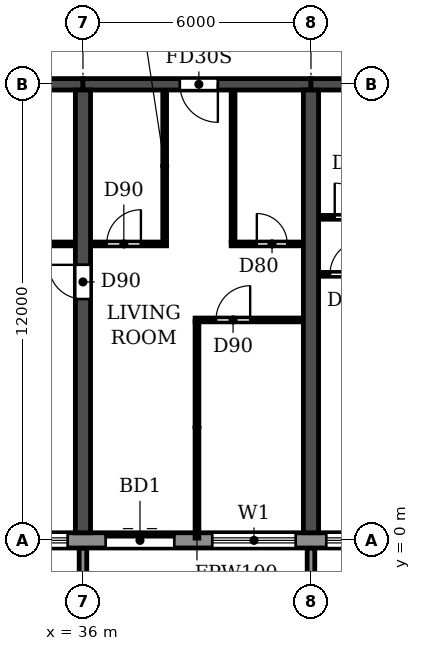
"""IFC4 building model, lengths in metres.
Left out: names, types, materials, properties, quantities, classifications, styles, units other than length and angle.
Written with IfcOpenShell. Run it as: python <this file> out.ifc"""

import sys

from ifc_helpers import new_model, si_unit, direction, frame, frame_2d, origin, place, context, subcontext, project, spatial, polyline, rectangle, outline, extrude, source, transform, mapped, element, fill, save


model = new_model("IFC4")
c1 = context("Model", 3, precision=1e-05, world=origin(), true_north=direction((0.0, 1.0)))
c2 = subcontext(c1, "Body", "Model", "MODEL_VIEW")
j1 = project(units=[si_unit("LENGTHUNIT", "METRE"), si_unit("PLANEANGLEUNIT", "RADIAN")], contexts=[c1])
p1 = place(None, origin())
s1 = spatial("IfcSite", under=j1, at=p1, CompositionType="ELEMENT")
p2 = place(p1, origin())
s2 = spatial("IfcBuilding", under=s1, at=p2, CompositionType="ELEMENT")
p3 = place(p2, frame((0.0, 0.0, 56.4)))
s3 = spatial("IfcBuildingStorey", under=s2, at=p3, CompositionType="ELEMENT", Elevation=56.4)
p4 = place(p3, frame((36.0, 0.2, 0.0), z_axis=(0.0, 0.0, 1.0), x_axis=(0.0, 1.0, 0.0)))
e1 = element("IfcWall", 1, at=p4, inside=s3, PredefinedType="SHEAR", context=c2, shape_type="SweptSolid", body=[
    extrude(rectangle(XDim=11.65, YDim=0.4, at=frame_2d((5.825, 0.0))), origin(), (0.0, 0.0, 1.0), 3.05),
])
p5 = place(p4, frame((6.15, 0.0, 0.0)))
e2 = element("IfcOpeningElement", 2, at=p5, cuts=e1, PredefinedType="OPENING", context=c2, shape_type="SweptSolid", body=[
    extrude(rectangle(XDim=0.9, YDim=2.1, at=frame_2d((0.45, 1.05))), frame((0.0, 0.21, 0.0), z_axis=(0.0, -1.0, 0.0), x_axis=(1.0, 0.0, 0.0)), (0.0, 0.0, 1.0), 0.42),
])
p6 = place(p3, frame((42.0, 0.2, 0.0), z_axis=(0.0, 0.0, 1.0), x_axis=(0.0, 1.0, 0.0)))
e3 = element("IfcWall", 3, at=p6, inside=s3, PredefinedType="SHEAR", context=c2, shape_type="SweptSolid", body=[
    extrude(rectangle(XDim=11.65, YDim=0.4, at=frame_2d((5.825, 0.0))), origin(), (0.0, 0.0, 1.0), 3.05),
])
p7 = place(p3, frame((30.0, 12.0, 0.0), z_axis=(0.0, 0.0, 1.0), x_axis=(1.0, 0.0, 0.0)))
e4 = element("IfcWall", 4, at=p7, inside=s3, PredefinedType="SHEAR", context=c2, shape_type="SweptSolid", body=[
    extrude(rectangle(XDim=6.0, YDim=0.3, at=frame_2d((3.0, 0.0))), origin(), (0.0, 0.0, 1.0), 2.45),
])
p8 = place(p3, frame((36.0, 12.0, 0.0), z_axis=(0.0, 0.0, 1.0), x_axis=(1.0, 0.0, 0.0)))
e5 = element("IfcWall", 5, at=p8, inside=s3, PredefinedType="SHEAR", context=c2, shape_type="SweptSolid", body=[
    extrude(rectangle(XDim=6.0, YDim=0.3, at=frame_2d((3.0, 0.0))), origin(), (0.0, 0.0, 1.0), 2.45),
])
p9 = place(p8, frame((2.55, 0.0, 0.0)))
e6 = element("IfcOpeningElement", 6, at=p9, cuts=e5, PredefinedType="OPENING", context=c2, shape_type="SweptSolid", body=[
    extrude(rectangle(XDim=1.0, YDim=2.1, at=frame_2d((0.5, 1.05))), frame((0.0, 0.16, 0.0), z_axis=(0.0, -1.0, 0.0), x_axis=(1.0, 0.0, 0.0)), (0.0, 0.0, 1.0), 0.32),
])
p10 = place(p3, frame((42.0, 12.0, 0.0), z_axis=(0.0, 0.0, 1.0), x_axis=(1.0, 0.0, 0.0)))
e7 = element("IfcWall", 7, at=p10, inside=s3, PredefinedType="SHEAR", context=c2, shape_type="SweptSolid", body=[
    extrude(rectangle(XDim=6.0, YDim=0.3, at=frame_2d((3.0, 0.0))), origin(), (0.0, 0.0, 1.0), 2.45),
])
p11 = place(p10, frame((2.55, 0.0, 0.0)))
e8 = element("IfcOpeningElement", 8, at=p11, cuts=e7, PredefinedType="OPENING", context=c2, shape_type="SweptSolid", body=[
    extrude(rectangle(XDim=1.0, YDim=2.1, at=frame_2d((0.5, 1.05))), frame((0.0, 0.16, 0.0), z_axis=(0.0, -1.0, 0.0), x_axis=(1.0, 0.0, 0.0)), (0.0, 0.0, 1.0), 0.32),
])
p12 = place(p3, frame((10.683, 0.0, 0.0), z_axis=(0.0, 0.0, 1.0), x_axis=(1.0, 0.0, 0.0)))
e9 = element("IfcWall", 9, at=p12, inside=s3, PredefinedType="STANDARD", context=c2, shape_type="SweptSolid", body=[
    extrude(rectangle(XDim=80.634, YDim=0.4, at=frame_2d((40.317, 0.0))), origin(), (0.0, 0.0, 1.0), 3.05),
])
p13 = place(p12, frame((1.717, 0.0, 0.9)))
e10 = element("IfcOpeningElement", 10, at=p13, cuts=e9, PredefinedType="OPENING", context=c2, shape_type="SweptSolid", body=[
    extrude(rectangle(XDim=2.2, YDim=1.5, at=frame_2d((1.1, 0.75))), frame((0.0, 0.21, 0.0), z_axis=(0.0, -1.0, 0.0), x_axis=(1.0, 0.0, 0.0)), (0.0, 0.0, 1.0), 0.42),
])
p14 = place(p12, frame((4.917, 0.0, 0.0)))
e11 = element("IfcOpeningElement", 11, at=p14, cuts=e9, PredefinedType="OPENING", context=c2, shape_type="SweptSolid", body=[
    extrude(rectangle(XDim=1.8, YDim=2.4, at=frame_2d((0.9, 1.2))), frame((0.0, 0.21, 0.0), z_axis=(0.0, -1.0, 0.0), x_axis=(1.0, 0.0, 0.0)), (0.0, 0.0, 1.0), 0.42),
])
p15 = place(p12, frame((7.717, 0.0, 0.9)))
e12 = element("IfcOpeningElement", 12, at=p15, cuts=e9, PredefinedType="OPENING", context=c2, shape_type="SweptSolid", body=[
    extrude(rectangle(XDim=2.2, YDim=1.5, at=frame_2d((1.1, 0.75))), frame((0.0, 0.21, 0.0), z_axis=(0.0, -1.0, 0.0), x_axis=(1.0, 0.0, 0.0)), (0.0, 0.0, 1.0), 0.42),
])
p16 = place(p12, frame((10.717, 0.0, 0.9)))
e13 = element("IfcOpeningElement", 13, at=p16, cuts=e9, PredefinedType="OPENING", context=c2, shape_type="SweptSolid", body=[
    extrude(rectangle(XDim=2.2, YDim=1.5, at=frame_2d((1.1, 0.75))), frame((0.0, 0.21, 0.0), z_axis=(0.0, -1.0, 0.0), x_axis=(1.0, 0.0, 0.0)), (0.0, 0.0, 1.0), 0.42),
])
p17 = place(p12, frame((13.717, 0.0, 0.9)))
e14 = element("IfcOpeningElement", 14, at=p17, cuts=e9, PredefinedType="OPENING", context=c2, shape_type="SweptSolid", body=[
    extrude(rectangle(XDim=2.2, YDim=1.5, at=frame_2d((1.1, 0.75))), frame((0.0, 0.21, 0.0), z_axis=(0.0, -1.0, 0.0), x_axis=(1.0, 0.0, 0.0)), (0.0, 0.0, 1.0), 0.42),
])
p18 = place(p12, frame((16.917, 0.0, 0.0)))
e15 = element("IfcOpeningElement", 15, at=p18, cuts=e9, PredefinedType="OPENING", context=c2, shape_type="SweptSolid", body=[
    extrude(rectangle(XDim=1.8, YDim=2.4, at=frame_2d((0.9, 1.2))), frame((0.0, 0.21, 0.0), z_axis=(0.0, -1.0, 0.0), x_axis=(1.0, 0.0, 0.0)), (0.0, 0.0, 1.0), 0.42),
])
p19 = place(p12, frame((19.717, 0.0, 0.9)))
e16 = element("IfcOpeningElement", 16, at=p19, cuts=e9, PredefinedType="OPENING", context=c2, shape_type="SweptSolid", body=[
    extrude(rectangle(XDim=2.2, YDim=1.5, at=frame_2d((1.1, 0.75))), frame((0.0, 0.21, 0.0), z_axis=(0.0, -1.0, 0.0), x_axis=(1.0, 0.0, 0.0)), (0.0, 0.0, 1.0), 0.42),
])
p20 = place(p12, frame((22.717, 0.0, 0.9)))
e17 = element("IfcOpeningElement", 17, at=p20, cuts=e9, PredefinedType="OPENING", context=c2, shape_type="SweptSolid", body=[
    extrude(rectangle(XDim=2.2, YDim=1.5, at=frame_2d((1.1, 0.75))), frame((0.0, 0.21, 0.0), z_axis=(0.0, -1.0, 0.0), x_axis=(1.0, 0.0, 0.0)), (0.0, 0.0, 1.0), 0.42),
])
p21 = place(p12, frame((25.917, 0.0, 0.0)))
e18 = element("IfcOpeningElement", 18, at=p21, cuts=e9, PredefinedType="OPENING", context=c2, shape_type="SweptSolid", body=[
    extrude(rectangle(XDim=1.8, YDim=2.4, at=frame_2d((0.9, 1.2))), frame((0.0, 0.21, 0.0), z_axis=(0.0, -1.0, 0.0), x_axis=(1.0, 0.0, 0.0)), (0.0, 0.0, 1.0), 0.42),
])
p22 = place(p12, frame((28.717, 0.0, 0.9)))
e19 = element("IfcOpeningElement", 19, at=p22, cuts=e9, PredefinedType="OPENING", context=c2, shape_type="SweptSolid", body=[
    extrude(rectangle(XDim=2.2, YDim=1.5, at=frame_2d((1.1, 0.75))), frame((0.0, 0.21, 0.0), z_axis=(0.0, -1.0, 0.0), x_axis=(1.0, 0.0, 0.0)), (0.0, 0.0, 1.0), 0.42),
])
p23 = place(p12, frame((31.717, 0.0, 0.9)))
e20 = element("IfcOpeningElement", 20, at=p23, cuts=e9, PredefinedType="OPENING", context=c2, shape_type="SweptSolid", body=[
    extrude(rectangle(XDim=2.2, YDim=1.5, at=frame_2d((1.1, 0.75))), frame((0.0, 0.21, 0.0), z_axis=(0.0, -1.0, 0.0), x_axis=(1.0, 0.0, 0.0)), (0.0, 0.0, 1.0), 0.42),
])
p24 = place(p12, frame((34.717, 0.0, 0.9)))
e21 = element("IfcOpeningElement", 21, at=p24, cuts=e9, PredefinedType="OPENING", context=c2, shape_type="SweptSolid", body=[
    extrude(rectangle(XDim=2.2, YDim=1.5, at=frame_2d((1.1, 0.75))), frame((0.0, 0.21, 0.0), z_axis=(0.0, -1.0, 0.0), x_axis=(1.0, 0.0, 0.0)), (0.0, 0.0, 1.0), 0.42),
])
p25 = place(p12, frame((37.717, 0.0, 0.9)))
e22 = element("IfcOpeningElement", 22, at=p25, cuts=e9, PredefinedType="OPENING", context=c2, shape_type="SweptSolid", body=[
    extrude(rectangle(XDim=2.2, YDim=1.5, at=frame_2d((1.1, 0.75))), frame((0.0, 0.21, 0.0), z_axis=(0.0, -1.0, 0.0), x_axis=(1.0, 0.0, 0.0)), (0.0, 0.0, 1.0), 0.42),
])
p26 = place(p12, frame((40.917, 0.0, 0.0)))
e23 = element("IfcOpeningElement", 23, at=p26, cuts=e9, PredefinedType="OPENING", context=c2, shape_type="SweptSolid", body=[
    extrude(rectangle(XDim=1.8, YDim=2.4, at=frame_2d((0.9, 1.2))), frame((0.0, 0.21, 0.0), z_axis=(0.0, -1.0, 0.0), x_axis=(1.0, 0.0, 0.0)), (0.0, 0.0, 1.0), 0.42),
])
p27 = place(p12, frame((43.717, 0.0, 0.9)))
e24 = element("IfcOpeningElement", 24, at=p27, cuts=e9, PredefinedType="OPENING", context=c2, shape_type="SweptSolid", body=[
    extrude(rectangle(XDim=2.2, YDim=1.5, at=frame_2d((1.1, 0.75))), frame((0.0, 0.21, 0.0), z_axis=(0.0, -1.0, 0.0), x_axis=(1.0, 0.0, 0.0)), (0.0, 0.0, 1.0), 0.42),
])
p28 = place(p12, frame((46.717, 0.0, 0.9)))
e25 = element("IfcOpeningElement", 25, at=p28, cuts=e9, PredefinedType="OPENING", context=c2, shape_type="SweptSolid", body=[
    extrude(rectangle(XDim=2.2, YDim=1.5, at=frame_2d((1.1, 0.75))), frame((0.0, 0.21, 0.0), z_axis=(0.0, -1.0, 0.0), x_axis=(1.0, 0.0, 0.0)), (0.0, 0.0, 1.0), 0.42),
])
p29 = place(p12, frame((49.717, 0.0, 0.9)))
e26 = element("IfcOpeningElement", 26, at=p29, cuts=e9, PredefinedType="OPENING", context=c2, shape_type="SweptSolid", body=[
    extrude(rectangle(XDim=2.2, YDim=1.5, at=frame_2d((1.1, 0.75))), frame((0.0, 0.21, 0.0), z_axis=(0.0, -1.0, 0.0), x_axis=(1.0, 0.0, 0.0)), (0.0, 0.0, 1.0), 0.42),
])
p30 = place(p12, frame((52.717, 0.0, 0.9)))
e27 = element("IfcOpeningElement", 27, at=p30, cuts=e9, PredefinedType="OPENING", context=c2, shape_type="SweptSolid", body=[
    extrude(rectangle(XDim=2.2, YDim=1.5, at=frame_2d((1.1, 0.75))), frame((0.0, 0.21, 0.0), z_axis=(0.0, -1.0, 0.0), x_axis=(1.0, 0.0, 0.0)), (0.0, 0.0, 1.0), 0.42),
])
p31 = place(p12, frame((55.717, 0.0, 0.9)))
e28 = element("IfcOpeningElement", 28, at=p31, cuts=e9, PredefinedType="OPENING", context=c2, shape_type="SweptSolid", body=[
    extrude(rectangle(XDim=2.2, YDim=1.5, at=frame_2d((1.1, 0.75))), frame((0.0, 0.21, 0.0), z_axis=(0.0, -1.0, 0.0), x_axis=(1.0, 0.0, 0.0)), (0.0, 0.0, 1.0), 0.42),
])
p32 = place(p12, frame((58.717, 0.0, 0.9)))
e29 = element("IfcOpeningElement", 29, at=p32, cuts=e9, PredefinedType="OPENING", context=c2, shape_type="SweptSolid", body=[
    extrude(rectangle(XDim=2.2, YDim=1.5, at=frame_2d((1.1, 0.75))), frame((0.0, 0.21, 0.0), z_axis=(0.0, -1.0, 0.0), x_axis=(1.0, 0.0, 0.0)), (0.0, 0.0, 1.0), 0.42),
])
p33 = place(p12, frame((61.717, 0.0, 0.9)))
e30 = element("IfcOpeningElement", 30, at=p33, cuts=e9, PredefinedType="OPENING", context=c2, shape_type="SweptSolid", body=[
    extrude(rectangle(XDim=2.2, YDim=1.5, at=frame_2d((1.1, 0.75))), frame((0.0, 0.21, 0.0), z_axis=(0.0, -1.0, 0.0), x_axis=(1.0, 0.0, 0.0)), (0.0, 0.0, 1.0), 0.42),
])
p34 = place(p12, frame((64.917, 0.0, 0.0)))
e31 = element("IfcOpeningElement", 31, at=p34, cuts=e9, PredefinedType="OPENING", context=c2, shape_type="SweptSolid", body=[
    extrude(rectangle(XDim=1.8, YDim=2.4, at=frame_2d((0.9, 1.2))), frame((0.0, 0.21, 0.0), z_axis=(0.0, -1.0, 0.0), x_axis=(1.0, 0.0, 0.0)), (0.0, 0.0, 1.0), 0.42),
])
p35 = place(p12, frame((67.717, 0.0, 0.9)))
e32 = element("IfcOpeningElement", 32, at=p35, cuts=e9, PredefinedType="OPENING", context=c2, shape_type="SweptSolid", body=[
    extrude(rectangle(XDim=2.2, YDim=1.5, at=frame_2d((1.1, 0.75))), frame((0.0, 0.21, 0.0), z_axis=(0.0, -1.0, 0.0), x_axis=(1.0, 0.0, 0.0)), (0.0, 0.0, 1.0), 0.42),
])
p36 = place(p12, frame((70.717, 0.0, 0.9)))
e33 = element("IfcOpeningElement", 33, at=p36, cuts=e9, PredefinedType="OPENING", context=c2, shape_type="SweptSolid", body=[
    extrude(rectangle(XDim=2.2, YDim=1.5, at=frame_2d((1.1, 0.75))), frame((0.0, 0.21, 0.0), z_axis=(0.0, -1.0, 0.0), x_axis=(1.0, 0.0, 0.0)), (0.0, 0.0, 1.0), 0.42),
])
p37 = place(p12, frame((73.717, 0.0, 0.9)))
e34 = element("IfcOpeningElement", 34, at=p37, cuts=e9, PredefinedType="OPENING", context=c2, shape_type="SweptSolid", body=[
    extrude(rectangle(XDim=2.2, YDim=1.5, at=frame_2d((1.1, 0.75))), frame((0.0, 0.21, 0.0), z_axis=(0.0, -1.0, 0.0), x_axis=(1.0, 0.0, 0.0)), (0.0, 0.0, 1.0), 0.42),
])
p38 = place(p12, frame((76.917, 0.0, 0.0)))
e35 = element("IfcOpeningElement", 35, at=p38, cuts=e9, PredefinedType="OPENING", context=c2, shape_type="SweptSolid", body=[
    extrude(rectangle(XDim=1.8, YDim=2.4, at=frame_2d((0.9, 1.2))), frame((0.0, 0.21, 0.0), z_axis=(0.0, -1.0, 0.0), x_axis=(1.0, 0.0, 0.0)), (0.0, 0.0, 1.0), 0.42),
])
m1 = source(origin(), c2, "Body", "SweptSolid", [
    extrude(outline(polyline([(0.0, 0.0), (0.2, 0.0), (0.2, 1.65), (0.0, 1.65), (0.0, 0.0)])), origin(), (0.0, 0.0, 1.0), 3.1),
])
for number, where in (
    (36, (35.9, -1.85, 0.0)),
    (37, (41.9, -1.85, 0.0)),
):
    element("IfcWall", number, at=place(p3, frame(where)), inside=s3, PredefinedType="STANDARD", context=c2, shape_type="MappedRepresentation", body=[
        mapped(m1, transform((0.0, 0.0, 0.0))),
    ])
p39 = place(p3, frame((38.95, 5.8, 0.0), z_axis=(0.0, 0.0, 1.0), x_axis=(1.0, 0.0, 0.0)))
e38 = element("IfcWall", 38, at=p39, inside=s3, PredefinedType="PARTITIONING", context=c2, shape_type="SweptSolid", body=[
    extrude(rectangle(XDim=2.84, YDim=0.1, at=frame_2d((1.42, 0.0))), origin(), (0.0, 0.0, 1.0), 3.05),
])
p40 = place(p39, frame((0.55, 0.0, 0.0)))
e39 = element("IfcOpeningElement", 39, at=p40, cuts=e38, PredefinedType="OPENING", context=c2, shape_type="SweptSolid", body=[
    extrude(rectangle(XDim=0.9, YDim=2.1, at=frame_2d((0.45, 1.05))), frame((0.0, 0.06, 0.0), z_axis=(0.0, -1.0, 0.0), x_axis=(1.0, 0.0, 0.0)), (0.0, 0.0, 1.0), 0.12),
])
p41 = place(p3, frame((42.21, 7.0, 0.0), z_axis=(0.0, 0.0, 1.0), x_axis=(1.0, 0.0, 0.0)))
e40 = element("IfcWall", 40, at=p41, inside=s3, PredefinedType="PARTITIONING", context=c2, shape_type="SweptSolid", body=[
    extrude(rectangle(XDim=2.84, YDim=0.1, at=frame_2d((1.42, 0.0))), origin(), (0.0, 0.0, 1.0), 3.05),
])
p42 = place(p41, frame((0.29, 0.0, 0.0)))
e41 = element("IfcOpeningElement", 41, at=p42, cuts=e40, PredefinedType="OPENING", context=c2, shape_type="SweptSolid", body=[
    extrude(rectangle(XDim=0.9, YDim=2.1, at=frame_2d((0.45, 1.05))), frame((0.0, 0.06, 0.0), z_axis=(0.0, -1.0, 0.0), x_axis=(1.0, 0.0, 0.0)), (0.0, 0.0, 1.0), 0.12),
])
p43 = place(p3, frame((33.1, 7.8, 0.0), z_axis=(0.0, 0.0, 1.0), x_axis=(1.0, 0.0, 0.0)))
e42 = element("IfcWall", 42, at=p43, inside=s3, PredefinedType="PARTITIONING", context=c2, shape_type="SweptSolid", body=[
    extrude(rectangle(XDim=2.69, YDim=0.1, at=frame_2d((1.345, 0.0))), origin(), (0.0, 0.0, 1.0), 3.05),
])
p44 = place(p43, frame((1.0, 0.0, 0.0)))
e43 = element("IfcOpeningElement", 43, at=p44, cuts=e42, PredefinedType="OPENING", context=c2, shape_type="SweptSolid", body=[
    extrude(rectangle(XDim=0.8, YDim=2.1, at=frame_2d((0.4, 1.05))), frame((0.0, 0.06, 0.0), z_axis=(0.0, -1.0, 0.0), x_axis=(1.0, 0.0, 0.0)), (0.0, 0.0, 1.0), 0.12),
])
p45 = place(p3, frame((36.21, 7.8, 0.0), z_axis=(0.0, 0.0, 1.0), x_axis=(1.0, 0.0, 0.0)))
e44 = element("IfcWall", 44, at=p45, inside=s3, PredefinedType="PARTITIONING", context=c2, shape_type="SweptSolid", body=[
    extrude(rectangle(XDim=1.99, YDim=0.1, at=frame_2d((0.995, 0.0))), origin(), (0.0, 0.0, 1.0), 3.05),
])
p46 = place(p45, frame((0.415, 0.0, 0.0)))
e45 = element("IfcOpeningElement", 45, at=p46, cuts=e44, PredefinedType="OPENING", context=c2, shape_type="SweptSolid", body=[
    extrude(rectangle(XDim=0.9, YDim=2.1, at=frame_2d((0.45, 1.05))), frame((0.0, 0.06, 0.0), z_axis=(0.0, -1.0, 0.0), x_axis=(1.0, 0.0, 0.0)), (0.0, 0.0, 1.0), 0.12),
])
p47 = place(p3, frame((39.9, 7.8, 0.0), z_axis=(0.0, 0.0, 1.0), x_axis=(1.0, 0.0, 0.0)))
e46 = element("IfcWall", 46, at=p47, inside=s3, PredefinedType="PARTITIONING", context=c2, shape_type="SweptSolid", body=[
    extrude(rectangle(XDim=1.89, YDim=0.1, at=frame_2d((0.945, 0.0))), origin(), (0.0, 0.0, 1.0), 3.05),
])
p48 = place(p47, frame((0.675, 0.0, 0.0)))
e47 = element("IfcOpeningElement", 47, at=p48, cuts=e46, PredefinedType="OPENING", context=c2, shape_type="SweptSolid", body=[
    extrude(rectangle(XDim=0.8, YDim=2.1, at=frame_2d((0.4, 1.05))), frame((0.0, 0.06, 0.0), z_axis=(0.0, -1.0, 0.0), x_axis=(1.0, 0.0, 0.0)), (0.0, 0.0, 1.0), 0.12),
])
p49 = place(p3, frame((42.21, 8.5, 0.0), z_axis=(0.0, 0.0, 1.0), x_axis=(1.0, 0.0, 0.0)))
e48 = element("IfcWall", 48, at=p49, inside=s3, PredefinedType="PARTITIONING", context=c2, shape_type="SweptSolid", body=[
    extrude(rectangle(XDim=1.99, YDim=0.1, at=frame_2d((0.995, 0.0))), origin(), (0.0, 0.0, 1.0), 3.05),
])
p50 = place(p49, frame((0.415, 0.0, 0.0)))
e49 = element("IfcOpeningElement", 49, at=p50, cuts=e48, PredefinedType="OPENING", context=c2, shape_type="SweptSolid", body=[
    extrude(rectangle(XDim=0.9, YDim=2.1, at=frame_2d((0.45, 1.05))), frame((0.0, 0.06, 0.0), z_axis=(0.0, -1.0, 0.0), x_axis=(1.0, 0.0, 0.0)), (0.0, 0.0, 1.0), 0.12),
])
p51 = place(p3, frame((38.15, 7.85, 0.0), z_axis=(0.0, 0.0, 1.0), x_axis=(0.0, 1.0, 0.0)))
e50 = element("IfcWall", 50, at=p51, inside=s3, PredefinedType="PARTITIONING", context=c2, shape_type="SweptSolid", body=[
    extrude(rectangle(XDim=3.99, YDim=0.1, at=frame_2d((1.995, 0.0))), origin(), (0.0, 0.0, 1.0), 3.05),
])
p52 = place(p3, frame((39.0, 0.06, 0.0), z_axis=(0.0, 0.0, 1.0), x_axis=(0.0, 1.0, 0.0)))
e51 = element("IfcWall", 51, at=p52, inside=s3, PredefinedType="PARTITIONING", context=c2, shape_type="SweptSolid", body=[
    extrude(rectangle(XDim=5.69, YDim=0.1, at=frame_2d((2.845, 0.0))), origin(), (0.0, 0.0, 1.0), 3.05),
])
p53 = place(p3, frame((39.95, 7.85, 0.0), z_axis=(0.0, 0.0, 1.0), x_axis=(0.0, 1.0, 0.0)))
e52 = element("IfcWall", 52, at=p53, inside=s3, PredefinedType="PARTITIONING", context=c2, shape_type="SweptSolid", body=[
    extrude(rectangle(XDim=3.99, YDim=0.1, at=frame_2d((1.995, 0.0))), origin(), (0.0, 0.0, 1.0), 3.05),
])
p54 = place(p20, origin())
e53 = element("IfcWindow", 53, at=p54, inside=s3, PartitioningType="DOUBLE_PANEL_HORIZONTAL", PredefinedType="WINDOW", context=c2, shape_type="SweptSolid", body=[
    extrude(rectangle(XDim=2.2, YDim=1.5, at=frame_2d((1.1, 0.75))), frame((0.0, 0.03, 0.0), z_axis=(0.0, -1.0, 0.0), x_axis=(1.0, 0.0, 0.0)), (0.0, 0.0, 1.0), 0.06),
])
fill(e17, e53)
p55 = place(p21, origin())
e54 = element("IfcDoor", 54, at=p55, inside=s3, OperationType="DOUBLE_DOOR_SLIDING", PredefinedType="DOOR", context=c2, shape_type="SweptSolid", body=[
    extrude(rectangle(XDim=1.8, YDim=2.4, at=frame_2d((0.9, 1.2))), frame((0.0, 0.025, 0.0), z_axis=(0.0, -1.0, 0.0), x_axis=(1.0, 0.0, 0.0)), (0.0, 0.0, 1.0), 0.05),
])
fill(e18, e54)
p56 = place(p22, origin())
e55 = element("IfcWindow", 55, at=p56, inside=s3, PartitioningType="DOUBLE_PANEL_HORIZONTAL", PredefinedType="WINDOW", context=c2, shape_type="SweptSolid", body=[
    extrude(rectangle(XDim=2.2, YDim=1.5, at=frame_2d((1.1, 0.75))), frame((0.0, 0.03, 0.0), z_axis=(0.0, -1.0, 0.0), x_axis=(1.0, 0.0, 0.0)), (0.0, 0.0, 1.0), 0.06),
])
fill(e19, e55)
p57 = place(p23, origin())
e56 = element("IfcWindow", 56, at=p57, inside=s3, PartitioningType="DOUBLE_PANEL_HORIZONTAL", PredefinedType="WINDOW", context=c2, shape_type="SweptSolid", body=[
    extrude(rectangle(XDim=2.2, YDim=1.5, at=frame_2d((1.1, 0.75))), frame((0.0, 0.03, 0.0), z_axis=(0.0, -1.0, 0.0), x_axis=(1.0, 0.0, 0.0)), (0.0, 0.0, 1.0), 0.06),
])
fill(e20, e56)
p58 = place(p5, origin())
e57 = element("IfcDoor", 57, at=p58, inside=s3, OperationType="SINGLE_SWING_RIGHT", PredefinedType="DOOR", context=c2, shape_type="SweptSolid", body=[
    extrude(rectangle(XDim=0.9, YDim=2.1, at=frame_2d((0.45, 1.05))), frame((0.0, 0.025, 0.0), z_axis=(0.0, -1.0, 0.0), x_axis=(1.0, 0.0, 0.0)), (0.0, 0.0, 1.0), 0.05),
])
fill(e2, e57)
p59 = place(p46, origin())
e58 = element("IfcDoor", 58, at=p59, inside=s3, OperationType="SINGLE_SWING_RIGHT", PredefinedType="DOOR", context=c2, shape_type="SweptSolid", body=[
    extrude(rectangle(XDim=0.9, YDim=2.1, at=frame_2d((0.45, 1.05))), frame((0.0, 0.025, 0.0), z_axis=(0.0, -1.0, 0.0), x_axis=(1.0, 0.0, 0.0)), (0.0, 0.0, 1.0), 0.05),
])
fill(e45, e58)
p60 = place(p9, frame((1.0, 0.0, 0.0), z_axis=(0.0, 0.0, 1.0), x_axis=(-1.0, 0.0, 0.0)))
e59 = element("IfcDoor", 59, at=p60, inside=s3, OperationType="SINGLE_SWING_LEFT", PredefinedType="DOOR", context=c2, shape_type="SweptSolid", body=[
    extrude(rectangle(XDim=1.0, YDim=2.1, at=frame_2d((0.5, 1.05))), frame((0.0, 0.025, 0.0), z_axis=(0.0, -1.0, 0.0), x_axis=(1.0, 0.0, 0.0)), (0.0, 0.0, 1.0), 0.05),
])
fill(e6, e59)
p61 = place(p40, origin())
e60 = element("IfcDoor", 60, at=p61, inside=s3, OperationType="SINGLE_SWING_RIGHT", PredefinedType="DOOR", context=c2, shape_type="SweptSolid", body=[
    extrude(rectangle(XDim=0.9, YDim=2.1, at=frame_2d((0.45, 1.05))), frame((0.0, 0.025, 0.0), z_axis=(0.0, -1.0, 0.0), x_axis=(1.0, 0.0, 0.0)), (0.0, 0.0, 1.0), 0.05),
])
fill(e39, e60)
p62 = place(p48, origin())
e61 = element("IfcDoor", 61, at=p62, inside=s3, OperationType="SINGLE_SWING_LEFT", PredefinedType="DOOR", context=c2, shape_type="SweptSolid", body=[
    extrude(rectangle(XDim=0.8, YDim=2.1, at=frame_2d((0.4, 1.05))), frame((0.0, 0.025, 0.0), z_axis=(0.0, -1.0, 0.0), x_axis=(1.0, 0.0, 0.0)), (0.0, 0.0, 1.0), 0.05),
])
fill(e47, e61)
p63 = place(p42, origin())
e62 = element("IfcDoor", 62, at=p63, inside=s3, OperationType="SINGLE_SWING_RIGHT", PredefinedType="DOOR", context=c2, shape_type="SweptSolid", body=[
    extrude(rectangle(XDim=0.9, YDim=2.1, at=frame_2d((0.45, 1.05))), frame((0.0, 0.025, 0.0), z_axis=(0.0, -1.0, 0.0), x_axis=(1.0, 0.0, 0.0)), (0.0, 0.0, 1.0), 0.05),
])
fill(e41, e62)
p64 = place(p50, origin())
e63 = element("IfcDoor", 63, at=p64, inside=s3, OperationType="SINGLE_SWING_LEFT", PredefinedType="DOOR", context=c2, shape_type="SweptSolid", body=[
    extrude(rectangle(XDim=0.9, YDim=2.1, at=frame_2d((0.45, 1.05))), frame((0.0, 0.025, 0.0), z_axis=(0.0, -1.0, 0.0), x_axis=(1.0, 0.0, 0.0)), (0.0, 0.0, 1.0), 0.05),
])
fill(e49, e63)
save(model, sys.argv[1])
